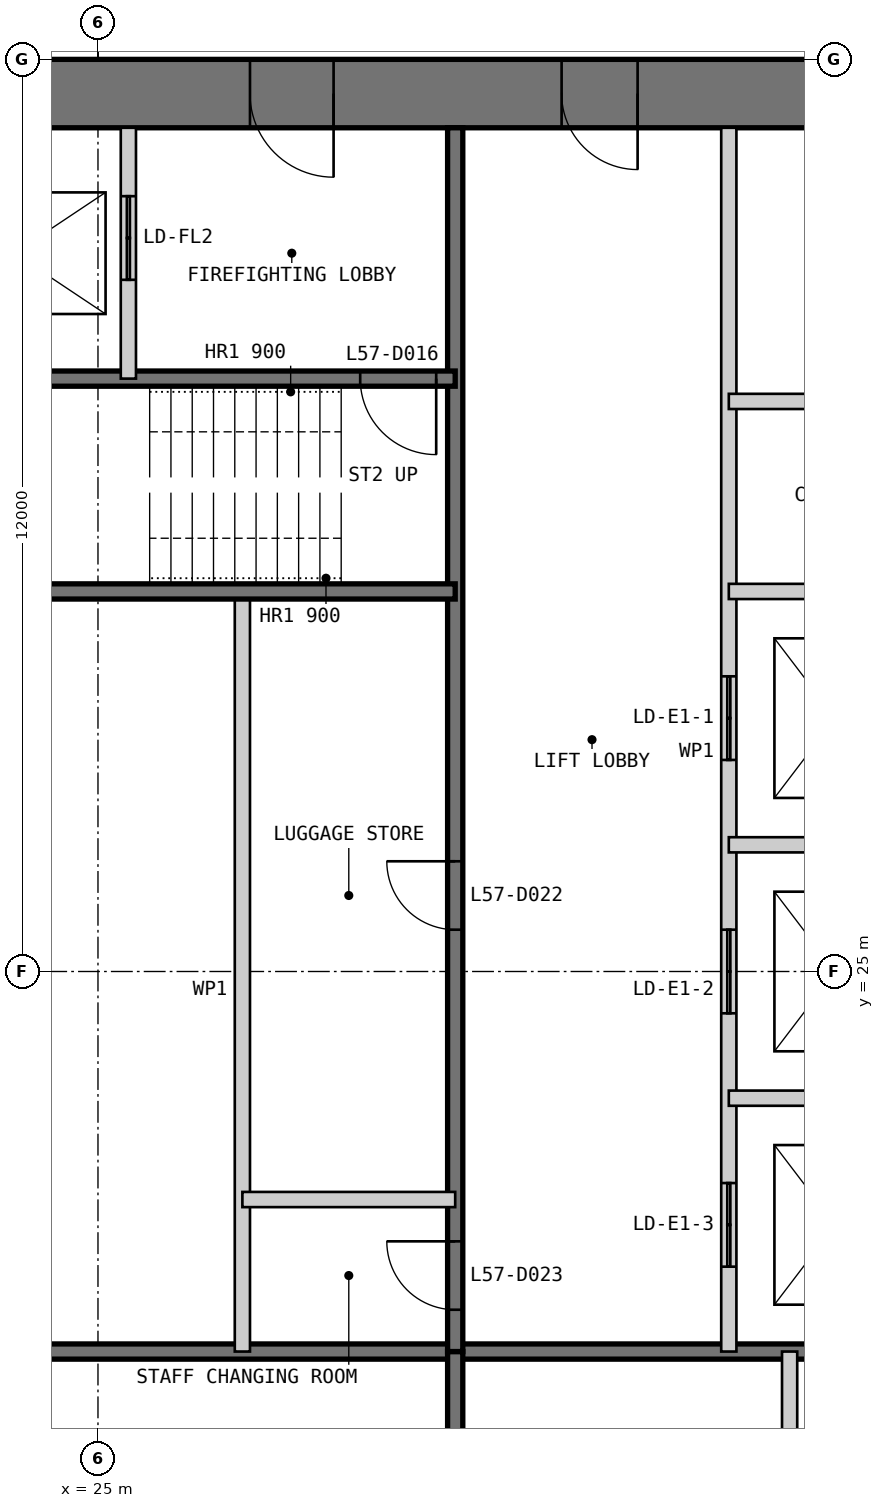
"""IFC4 building model, lengths in metres.
Left out: names, types, materials, properties, quantities, classifications, styles, units other than length and angle.
Written with IfcOpenShell. Run it as: python <this file> out.ifc"""

import sys

from ifc_helpers import new_model, si_unit, direction, frame, frame_2d, origin, place, context, subcontext, project, spatial, polyline, rectangle, outline, extrude, element, fill, save


model = new_model("IFC4")
c1 = context("Model", 3, precision=1e-05, world=origin(), true_north=direction((0.0, 1.0)))
c2 = subcontext(c1, "Body", "Model", "MODEL_VIEW")
j1 = project(units=[si_unit("LENGTHUNIT", "METRE"), si_unit("PLANEANGLEUNIT", "RADIAN")], contexts=[c1])
p1 = place(None, origin())
s1 = spatial("IfcSite", under=j1, at=p1, CompositionType="ELEMENT")
p2 = place(p1, origin())
s2 = spatial("IfcBuilding", under=s1, at=p2, CompositionType="ELEMENT")
p3 = place(p2, frame((0.0, 0.0, 245.8)))
s3 = spatial("IfcBuildingStorey", under=s2, at=p3, CompositionType="ELEMENT", Elevation=245.8)
p4 = place(p3, frame((37.0, 36.55, 0.0), z_axis=(0.0, 0.0, 1.0), x_axis=(-1.0, 0.0, 0.0)))
e1 = element("IfcWall", 1, at=p4, inside=s3, PredefinedType="SHEAR", context=c2, shape_type="SweptSolid", body=[
    extrude(outline(polyline([(0.0, -0.45), (24.0, -0.45), (23.1, 0.45), (0.9, 0.45), (0.0, -0.45)])), origin(), (0.0, 0.0, 1.0), 3.4),
])
p5 = place(p4, frame((4.9, 0.0, 0.0)))
e2 = element("IfcOpeningElement", 2, at=p5, cuts=e1, PredefinedType="OPENING", context=c2, shape_type="SweptSolid", body=[
    extrude(rectangle(XDim=1.0, YDim=2.2, at=frame_2d((0.5, 1.1))), frame((0.0, 0.46, 0.0), z_axis=(0.0, -1.0, 0.0), x_axis=(1.0, 0.0, 0.0)), (0.0, 0.0, 1.0), 0.92),
])
p6 = place(p4, frame((8.9, 0.0, 0.0)))
e3 = element("IfcOpeningElement", 3, at=p6, cuts=e1, PredefinedType="OPENING", context=c2, shape_type="SweptSolid", body=[
    extrude(rectangle(XDim=1.1, YDim=2.2, at=frame_2d((0.55, 1.1))), frame((0.0, 0.46, 0.0), z_axis=(0.0, -1.0, 0.0), x_axis=(1.0, 0.0, 0.0)), (0.0, 0.0, 1.0), 0.92),
])
p7 = place(p4, frame((15.05, 0.0, 0.0)))
e4 = element("IfcOpeningElement", 4, at=p7, cuts=e1, PredefinedType="OPENING", context=c2, shape_type="SweptSolid", body=[
    extrude(rectangle(XDim=0.9, YDim=2.2, at=frame_2d((0.45, 1.1))), frame((0.0, 0.46, 0.0), z_axis=(0.0, -1.0, 0.0), x_axis=(1.0, 0.0, 0.0)), (0.0, 0.0, 1.0), 0.92),
])
p8 = place(p4, frame((17.9, 0.0, 0.0)))
e5 = element("IfcOpeningElement", 5, at=p8, cuts=e1, PredefinedType="OPENING", context=c2, shape_type="SweptSolid", body=[
    extrude(rectangle(XDim=1.0, YDim=2.2, at=frame_2d((0.5, 1.1))), frame((0.0, 0.46, 0.0), z_axis=(0.0, -1.0, 0.0), x_axis=(1.0, 0.0, 0.0)), (0.0, 0.0, 1.0), 0.92),
])
p9 = place(p4, frame((21.4, 0.0, 0.0)))
e6 = element("IfcOpeningElement", 6, at=p9, cuts=e1, PredefinedType="OPENING", context=c2, shape_type="SweptSolid", body=[
    extrude(rectangle(XDim=1.0, YDim=2.2, at=frame_2d((0.5, 1.1))), frame((0.0, 0.46, 0.0), z_axis=(0.0, -1.0, 0.0), x_axis=(1.0, 0.0, 0.0)), (0.0, 0.0, 1.0), 0.92),
])
p10 = place(p3, frame((20.3, 20.0, 0.0), z_axis=(0.0, 0.0, 1.0), x_axis=(1.0, 0.0, 0.0)))
e7 = element("IfcWall", 7, at=p10, inside=s3, PredefinedType="SOLIDWALL", context=c2, shape_type="SweptSolid", body=[
    extrude(rectangle(XDim=15.8, YDim=0.2, at=frame_2d((7.9, 0.0))), origin(), (0.0, 0.0, 1.0), 3.2),
])
p11 = place(p3, frame((29.7, 13.9, 0.0), z_axis=(0.0, 0.0, 1.0), x_axis=(0.0, 1.0, 0.0)))
e8 = element("IfcWall", 8, at=p11, inside=s3, PredefinedType="SOLIDWALL", context=c2, shape_type="SweptSolid", body=[
    extrude(rectangle(XDim=6.1, YDim=0.2, at=frame_2d((3.05, 0.0))), origin(), (0.0, 0.0, 1.0), 3.2),
])
p12 = place(p3, frame((34.1, 13.9, 0.0), z_axis=(0.0, 0.0, 1.0), x_axis=(0.0, 1.0, 0.0)))
e9 = element("IfcWall", 9, at=p12, inside=s3, PredefinedType="PARTITIONING", context=c2, shape_type="SweptSolid", body=[
    extrude(rectangle(XDim=6.1, YDim=0.2, at=frame_2d((3.05, 0.0))), origin(), (0.0, 0.0, 1.0), 3.2),
])
p13 = place(p3, frame((33.3, 36.1, 0.0), z_axis=(0.0, 0.0, 1.0), x_axis=(0.0, -1.0, 0.0)))
e10 = element("IfcWall", 10, at=p13, inside=s3, PredefinedType="PARTITIONING", context=c2, shape_type="SweptSolid", body=[
    extrude(rectangle(XDim=16.1, YDim=0.2, at=frame_2d((8.05, 0.0))), origin(), (0.0, 0.0, 1.0), 3.2),
])
p14 = place(p13, frame((7.217, 0.0, 0.0)))
e11 = element("IfcOpeningElement", 11, at=p14, cuts=e10, PredefinedType="OPENING", context=c2, shape_type="SweptSolid", body=[
    extrude(rectangle(XDim=1.1, YDim=2.2, at=frame_2d((0.55, 1.1))), frame((0.0, 0.11, 0.0), z_axis=(0.0, -1.0, 0.0), x_axis=(1.0, 0.0, 0.0)), (0.0, 0.0, 1.0), 0.22),
])
p15 = place(p13, frame((10.55, 0.0, 0.0)))
e12 = element("IfcOpeningElement", 12, at=p15, cuts=e10, PredefinedType="OPENING", context=c2, shape_type="SweptSolid", body=[
    extrude(rectangle(XDim=1.1, YDim=2.2, at=frame_2d((0.55, 1.1))), frame((0.0, 0.11, 0.0), z_axis=(0.0, -1.0, 0.0), x_axis=(1.0, 0.0, 0.0)), (0.0, 0.0, 1.0), 0.22),
])
p16 = place(p13, frame((13.883, 0.0, 0.0)))
e13 = element("IfcOpeningElement", 13, at=p16, cuts=e10, PredefinedType="OPENING", context=c2, shape_type="SweptSolid", body=[
    extrude(rectangle(XDim=1.1, YDim=2.2, at=frame_2d((0.55, 1.1))), frame((0.0, 0.11, 0.0), z_axis=(0.0, -1.0, 0.0), x_axis=(1.0, 0.0, 0.0)), (0.0, 0.0, 1.0), 0.22),
])
p17 = place(p3, frame((29.7, 36.1, 0.0), z_axis=(0.0, 0.0, 1.0), x_axis=(0.0, -1.0, 0.0)))
e14 = element("IfcWall", 14, at=p17, inside=s3, PredefinedType="SOLIDWALL", context=c2, shape_type="SweptSolid", body=[
    extrude(rectangle(XDim=16.1, YDim=0.2, at=frame_2d((8.05, 0.0))), origin(), (0.0, 0.0, 1.0), 3.2),
])
p18 = place(p17, frame((9.65, 0.0, 0.0)))
e15 = element("IfcOpeningElement", 15, at=p18, cuts=e14, PredefinedType="OPENING", context=c2, shape_type="SweptSolid", body=[
    extrude(rectangle(XDim=0.9, YDim=2.2, at=frame_2d((0.45, 1.1))), frame((0.0, 0.11, 0.0), z_axis=(0.0, -1.0, 0.0), x_axis=(1.0, 0.0, 0.0)), (0.0, 0.0, 1.0), 0.22),
])
p19 = place(p17, frame((14.65, 0.0, 0.0)))
e16 = element("IfcOpeningElement", 16, at=p19, cuts=e14, PredefinedType="OPENING", context=c2, shape_type="SweptSolid", body=[
    extrude(rectangle(XDim=0.9, YDim=2.2, at=frame_2d((0.45, 1.1))), frame((0.0, 0.11, 0.0), z_axis=(0.0, -1.0, 0.0), x_axis=(1.0, 0.0, 0.0)), (0.0, 0.0, 1.0), 0.22),
])
for number, where, z_axis, x_axis in (
    (17, (36.1, 30.0, 0.0), (0.0, 0.0, 1.0), (-1.0, 0.0, 0.0)),
    (18, (36.1, 26.667, 0.0), (0.0, 0.0, 1.0), (-1.0, 0.0, 0.0)),
    (19, (36.1, 23.333, 0.0), (0.0, 0.0, 1.0), (-1.0, 0.0, 0.0)),
):
    element("IfcWall", number, at=place(p3, frame(where, z_axis=z_axis, x_axis=x_axis)), inside=s3, PredefinedType="PARTITIONING", context=c2, shape_type="SweptSolid", body=[
        extrude(rectangle(XDim=2.8, YDim=0.2, at=frame_2d((1.4, 0.0))), origin(), (0.0, 0.0, 1.0), 3.2),
    ])
p20 = place(p3, frame((26.9, 30.0, 0.0), z_axis=(0.0, 0.0, 1.0), x_axis=(0.0, -1.0, 0.0)))
e20 = element("IfcWall", 20, at=p20, inside=s3, PredefinedType="PARTITIONING", context=c2, shape_type="SweptSolid", body=[
    extrude(rectangle(XDim=10.0, YDim=0.2, at=frame_2d((5.0, 0.0))), origin(), (0.0, 0.0, 1.0), 3.2),
])
p21 = place(p3, frame((29.7, 32.8, 0.0), z_axis=(0.0, 0.0, 1.0), x_axis=(-1.0, 0.0, 0.0)))
e21 = element("IfcWall", 21, at=p21, inside=s3, PredefinedType="SOLIDWALL", context=c2, shape_type="SweptSolid", body=[
    extrude(rectangle(XDim=9.4, YDim=0.2, at=frame_2d((4.7, 0.0))), origin(), (0.0, 0.0, 1.0), 3.2),
])
p22 = place(p21, frame((0.25, 0.0, 0.0)))
e22 = element("IfcOpeningElement", 22, at=p22, cuts=e21, PredefinedType="OPENING", context=c2, shape_type="SweptSolid", body=[
    extrude(rectangle(XDim=1.0, YDim=2.2, at=frame_2d((0.5, 1.1))), frame((0.0, 0.11, 0.0), z_axis=(0.0, -1.0, 0.0), x_axis=(1.0, 0.0, 0.0)), (0.0, 0.0, 1.0), 0.22),
])
p23 = place(p3, frame((29.7, 30.0, 0.0), z_axis=(0.0, 0.0, 1.0), x_axis=(-1.0, 0.0, 0.0)))
e23 = element("IfcWall", 23, at=p23, inside=s3, PredefinedType="SOLIDWALL", context=c2, shape_type="SweptSolid", body=[
    extrude(rectangle(XDim=15.8, YDim=0.2, at=frame_2d((7.9, 0.0))), origin(), (0.0, 0.0, 1.0), 3.2),
])
p24 = place(p3, frame((25.4, 36.1, 0.0), z_axis=(0.0, 0.0, 1.0), x_axis=(0.0, -1.0, 0.0)))
e24 = element("IfcWall", 24, at=p24, inside=s3, PredefinedType="PARTITIONING", context=c2, shape_type="SweptSolid", body=[
    extrude(rectangle(XDim=3.3, YDim=0.2, at=frame_2d((1.65, 0.0))), origin(), (0.0, 0.0, 1.0), 3.2),
])
p25 = place(p24, frame((0.9, 0.0, 0.0)))
e25 = element("IfcOpeningElement", 25, at=p25, cuts=e24, PredefinedType="OPENING", context=c2, shape_type="SweptSolid", body=[
    extrude(rectangle(XDim=1.1, YDim=2.2, at=frame_2d((0.55, 1.1))), frame((0.0, 0.11, 0.0), z_axis=(0.0, -1.0, 0.0), x_axis=(1.0, 0.0, 0.0)), (0.0, 0.0, 1.0), 0.22),
])
for number, where, z_axis, x_axis in (
    (26, (36.1, 32.5, 0.0), (0.0, 0.0, 1.0), (-1.0, 0.0, 0.0)),
    (27, (29.7, 22.0, 0.0), (0.0, 0.0, 1.0), (-1.0, 0.0, 0.0)),
):
    element("IfcWall", number, at=place(p3, frame(where, z_axis=z_axis, x_axis=x_axis)), inside=s3, PredefinedType="PARTITIONING", context=c2, shape_type="SweptSolid", body=[
        extrude(rectangle(XDim=2.8, YDim=0.2, at=frame_2d((1.4, 0.0))), origin(), (0.0, 0.0, 1.0), 3.2),
    ])
p26 = place(p5, origin())
e28 = element("IfcDoor", 28, at=p26, inside=s3, OperationType="SINGLE_SWING_LEFT", PredefinedType="DOOR", context=c2, shape_type="SweptSolid", body=[
    extrude(rectangle(XDim=1.0, YDim=2.2, at=frame_2d((0.5, 1.1))), frame((0.0, 0.025, 0.0), z_axis=(0.0, -1.0, 0.0), x_axis=(1.0, 0.0, 0.0)), (0.0, 0.0, 1.0), 0.05),
    extrude(outline(polyline([(0.0, 0.0), (0.04, 0.0), (0.04, 2.16), (0.96, 2.16), (0.96, 0.0), (1.0, 0.0), (1.0, 2.2), (0.0, 2.2), (0.0, 0.0)])), frame((0.0, 0.3, 0.0), z_axis=(0.0, -1.0, 0.0), x_axis=(1.0, 0.0, 0.0)), (0.0, 0.0, 1.0), 0.6),
])
fill(e2, e28)
p27 = place(p6, origin())
e29 = element("IfcDoor", 29, at=p27, inside=s3, OperationType="SINGLE_SWING_LEFT", PredefinedType="DOOR", context=c2, shape_type="SweptSolid", body=[
    extrude(rectangle(XDim=1.1, YDim=2.2, at=frame_2d((0.55, 1.1))), frame((0.0, 0.025, 0.0), z_axis=(0.0, -1.0, 0.0), x_axis=(1.0, 0.0, 0.0)), (0.0, 0.0, 1.0), 0.05),
    extrude(outline(polyline([(0.0, 0.0), (0.04, 0.0), (0.04, 2.16), (1.06, 2.16), (1.06, 0.0), (1.1, 0.0), (1.1, 2.2), (0.0, 2.2), (0.0, 0.0)])), frame((0.0, 0.3, 0.0), z_axis=(0.0, -1.0, 0.0), x_axis=(1.0, 0.0, 0.0)), (0.0, 0.0, 1.0), 0.6),
])
fill(e3, e29)
p28 = place(p22, origin())
e30 = element("IfcDoor", 30, at=p28, inside=s3, OperationType="SINGLE_SWING_LEFT", PredefinedType="DOOR", context=c2, shape_type="SweptSolid", body=[
    extrude(rectangle(XDim=1.0, YDim=2.2, at=frame_2d((0.5, 1.1))), frame((0.0, 0.025, 0.0), z_axis=(0.0, -1.0, 0.0), x_axis=(1.0, 0.0, 0.0)), (0.0, 0.0, 1.0), 0.05),
])
fill(e22, e30)
p29 = place(p18, frame((0.9, 0.0, 0.0), z_axis=(0.0, 0.0, 1.0), x_axis=(-1.0, 0.0, 0.0)))
e31 = element("IfcDoor", 31, at=p29, inside=s3, OperationType="SINGLE_SWING_RIGHT", PredefinedType="DOOR", context=c2, shape_type="SweptSolid", body=[
    extrude(rectangle(XDim=0.9, YDim=2.2, at=frame_2d((0.45, 1.1))), frame((0.0, 0.025, 0.0), z_axis=(0.0, -1.0, 0.0), x_axis=(1.0, 0.0, 0.0)), (0.0, 0.0, 1.0), 0.05),
])
fill(e15, e31)
p30 = place(p19, frame((0.9, 0.0, 0.0), z_axis=(0.0, 0.0, 1.0), x_axis=(-1.0, 0.0, 0.0)))
e32 = element("IfcDoor", 32, at=p30, inside=s3, OperationType="SINGLE_SWING_RIGHT", PredefinedType="DOOR", context=c2, shape_type="SweptSolid", body=[
    extrude(rectangle(XDim=0.9, YDim=2.2, at=frame_2d((0.45, 1.1))), frame((0.0, 0.025, 0.0), z_axis=(0.0, -1.0, 0.0), x_axis=(1.0, 0.0, 0.0)), (0.0, 0.0, 1.0), 0.05),
])
fill(e16, e32)
p31 = place(p25, origin())
e33 = element("IfcDoor", 33, at=p31, inside=s3, OperationType="DOUBLE_DOOR_SLIDING", PredefinedType="DOOR", context=c2, shape_type="SweptSolid", body=[
    extrude(rectangle(XDim=1.1, YDim=2.2, at=frame_2d((0.55, 1.1))), frame((0.0, 0.025, 0.0), z_axis=(0.0, -1.0, 0.0), x_axis=(1.0, 0.0, 0.0)), (0.0, 0.0, 1.0), 0.05),
])
fill(e25, e33)
p32 = place(p14, origin())
e34 = element("IfcDoor", 34, at=p32, inside=s3, OperationType="DOUBLE_DOOR_SLIDING", PredefinedType="DOOR", context=c2, shape_type="SweptSolid", body=[
    extrude(rectangle(XDim=1.1, YDim=2.2, at=frame_2d((0.55, 1.1))), frame((0.0, 0.025, 0.0), z_axis=(0.0, -1.0, 0.0), x_axis=(1.0, 0.0, 0.0)), (0.0, 0.0, 1.0), 0.05),
])
fill(e11, e34)
p33 = place(p15, origin())
e35 = element("IfcDoor", 35, at=p33, inside=s3, OperationType="DOUBLE_DOOR_SLIDING", PredefinedType="DOOR", context=c2, shape_type="SweptSolid", body=[
    extrude(rectangle(XDim=1.1, YDim=2.2, at=frame_2d((0.55, 1.1))), frame((0.0, 0.025, 0.0), z_axis=(0.0, -1.0, 0.0), x_axis=(1.0, 0.0, 0.0)), (0.0, 0.0, 1.0), 0.05),
])
fill(e12, e35)
p34 = place(p16, origin())
e36 = element("IfcDoor", 36, at=p34, inside=s3, OperationType="DOUBLE_DOOR_SLIDING", PredefinedType="DOOR", context=c2, shape_type="SweptSolid", body=[
    extrude(rectangle(XDim=1.1, YDim=2.2, at=frame_2d((0.55, 1.1))), frame((0.0, 0.025, 0.0), z_axis=(0.0, -1.0, 0.0), x_axis=(1.0, 0.0, 0.0)), (0.0, 0.0, 1.0), 0.05),
])
fill(e13, e36)
save(model, sys.argv[1])
